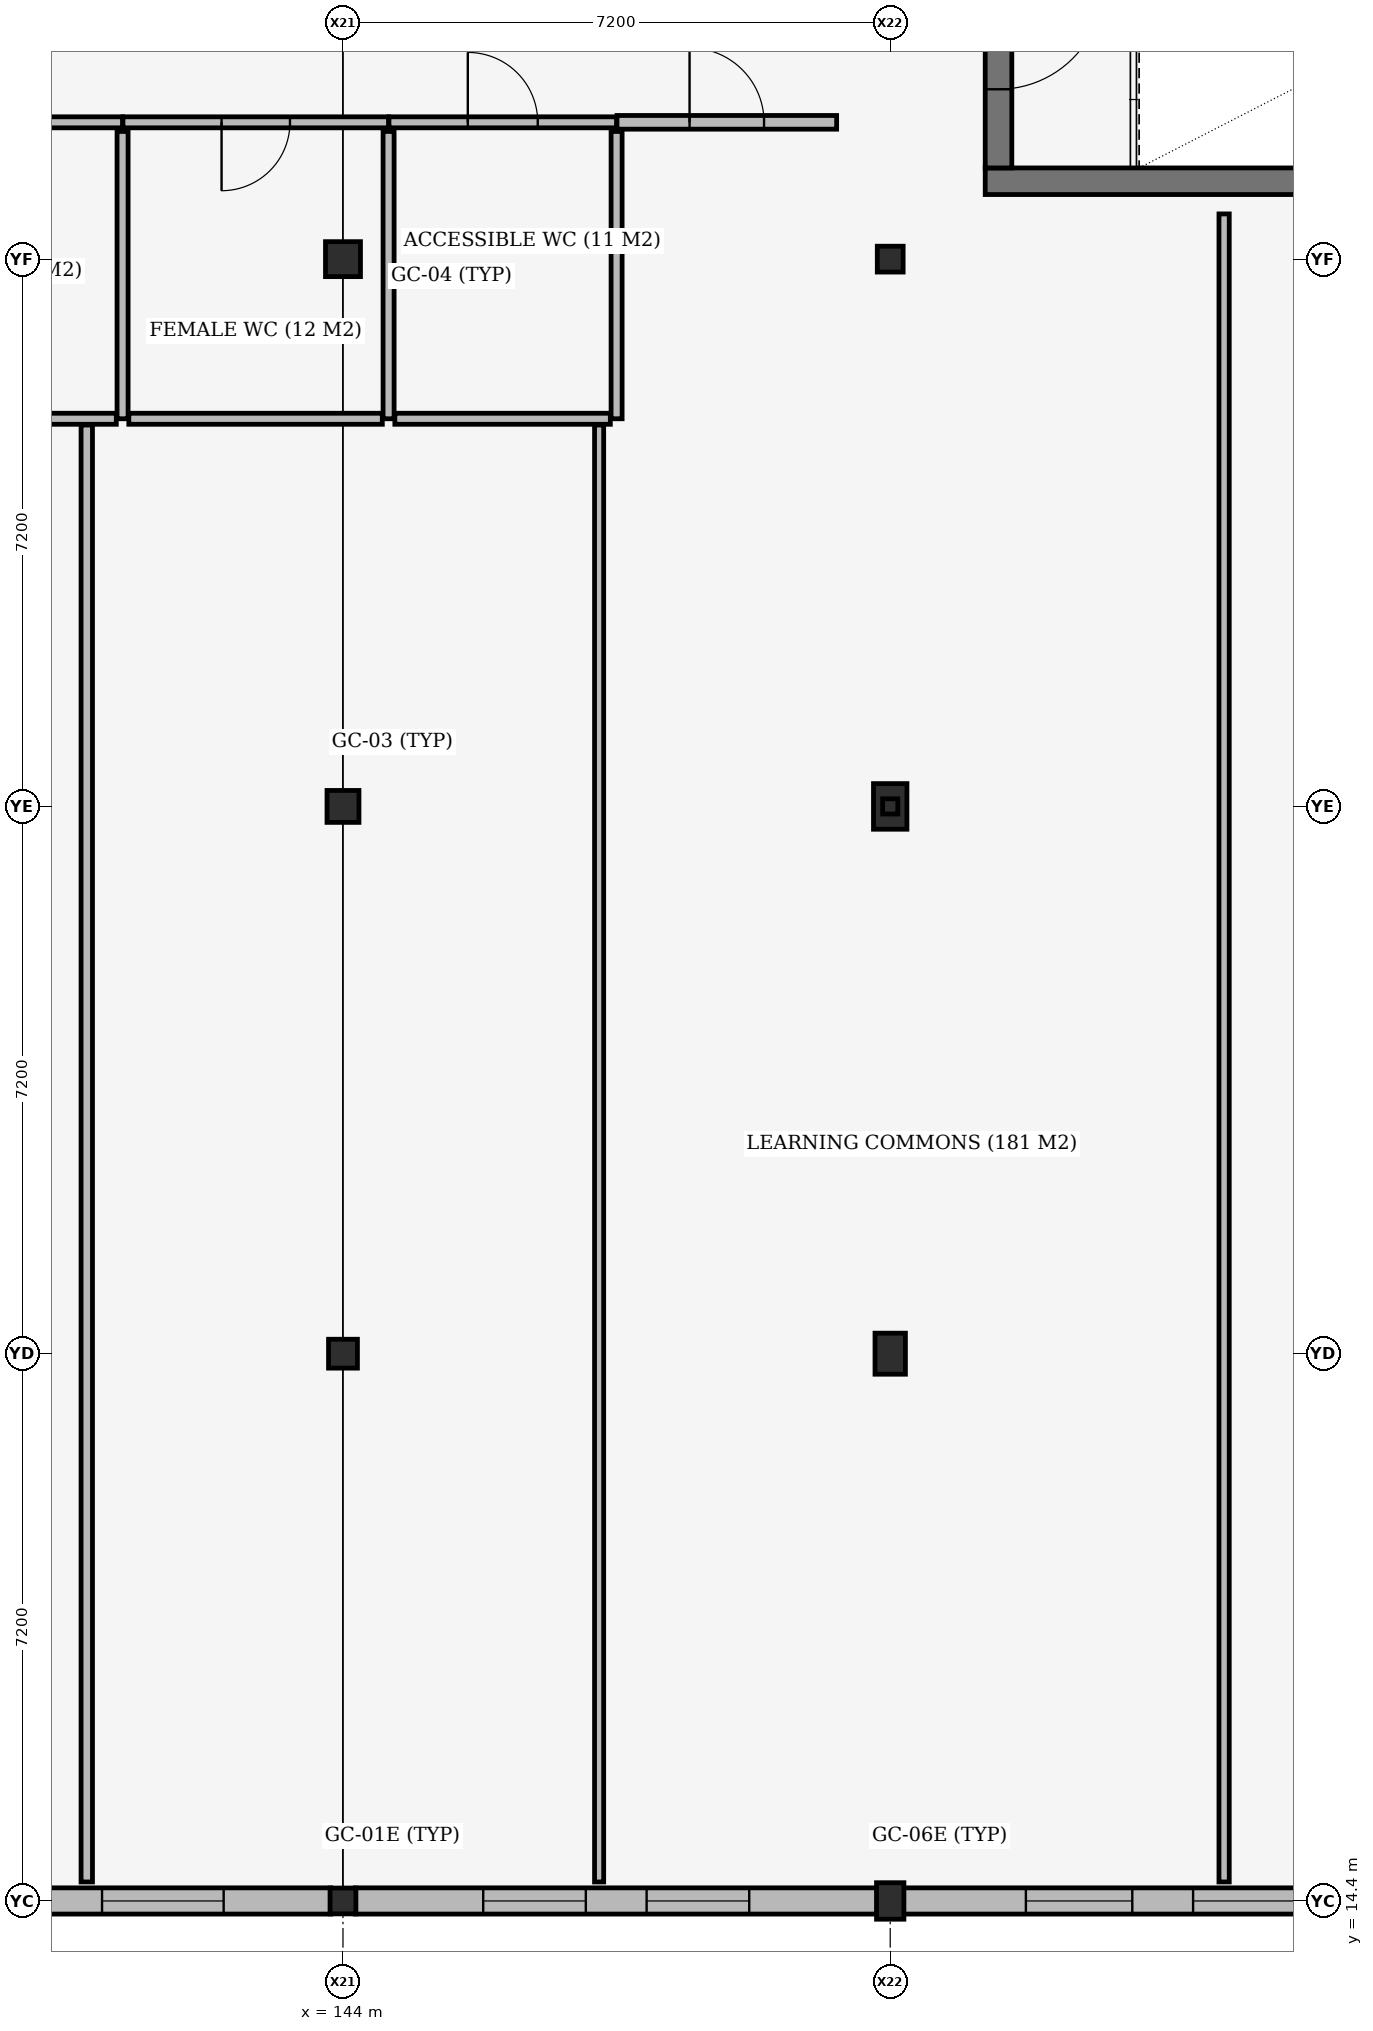
"""IFC4 building model, lengths in metres.
Left out: names, types, materials, properties, quantities, classifications, styles, units other than length and angle.
Written with IfcOpenShell. Run it as: python <this file> out.ifc"""

import sys

from ifc_helpers import new_model, si_unit, direction, frame, frame_2d, origin, origin_2d, place, context, subcontext, project, spatial, rectangle, i_section, extrude, element, fill, save


model = new_model("IFC4")
c1 = context("Model", 3, precision=1e-05, world=origin(), true_north=direction((0.0, 1.0)))
c2 = subcontext(c1, "Body", "Model", "MODEL_VIEW")
j1 = project(units=[si_unit("LENGTHUNIT", "METRE"), si_unit("PLANEANGLEUNIT", "RADIAN")], contexts=[c1])
p1 = place(None, origin())
s1 = spatial("IfcSite", under=j1, at=p1, CompositionType="ELEMENT")
p2 = place(p1, origin())
s2 = spatial("IfcBuilding", under=s1, at=p2, CompositionType="ELEMENT")
p3 = place(p2, frame((0.0, 0.0, 13.8)))
s3 = spatial("IfcBuildingStorey", under=s2, at=p3, CompositionType="ELEMENT", Elevation=13.8)
p4 = place(p3, frame((144.0, 14.4, 0.0), z_axis=(0.0, 0.0, 1.0), x_axis=(1.0, 0.0, 0.0)))
e1 = element("IfcColumn", 1, at=p4, inside=s3, PredefinedType="COLUMN", context=c2, shape_type="SweptSolid", body=[
    extrude(rectangle(XDim=0.34, YDim=0.34, at=origin_2d()), origin(), (0.0, 0.0, 1.0), 3.96),
])
p5 = place(p3, frame((144.0, 21.6, 0.0), z_axis=(0.0, 0.0, 1.0), x_axis=(1.0, 0.0, 0.0)))
e2 = element("IfcColumn", 2, at=p5, inside=s3, PredefinedType="COLUMN", context=c2, shape_type="SweptSolid", body=[
    extrude(rectangle(XDim=0.38, YDim=0.38, at=origin_2d()), origin(), (0.0, 0.0, 1.0), 3.96),
])
p6 = place(p3, frame((144.0, 28.8, 0.0), z_axis=(0.0, 0.0, 1.0), x_axis=(1.0, 0.0, 0.0)))
e3 = element("IfcColumn", 3, at=p6, inside=s3, PredefinedType="COLUMN", context=c2, shape_type="SweptSolid", body=[
    extrude(rectangle(XDim=0.42, YDim=0.42, at=origin_2d()), origin(), (0.0, 0.0, 1.0), 3.96),
])
p7 = place(p3, frame((144.0, 36.0, 0.0), z_axis=(0.0, 0.0, 1.0), x_axis=(1.0, 0.0, 0.0)))
e4 = element("IfcColumn", 4, at=p7, inside=s3, PredefinedType="COLUMN", context=c2, shape_type="SweptSolid", body=[
    extrude(rectangle(XDim=0.46, YDim=0.46, at=origin_2d()), origin(), (0.0, 0.0, 1.0), 3.96),
])
p8 = place(p3, frame((151.2, 14.4, 0.0), z_axis=(0.0, 0.0, 1.0), x_axis=(1.0, 0.0, 0.0)))
e5 = element("IfcColumn", 5, at=p8, inside=s3, PredefinedType="COLUMN", context=c2, shape_type="SweptSolid", body=[
    extrude(rectangle(XDim=0.36, YDim=0.48, at=origin_2d()), origin(), (0.0, 0.0, 1.0), 3.96),
])
p9 = place(p3, frame((151.2, 21.6, 0.0), z_axis=(0.0, 0.0, 1.0), x_axis=(1.0, 0.0, 0.0)))
e6 = element("IfcColumn", 6, at=p9, inside=s3, PredefinedType="COLUMN", context=c2, shape_type="SweptSolid", body=[
    extrude(rectangle(XDim=0.4, YDim=0.54, at=origin_2d()), origin(), (0.0, 0.0, 1.0), 3.96),
])
p10 = place(p3, frame((151.2, 28.8, 0.0), z_axis=(0.0, 0.0, 1.0), x_axis=(1.0, 0.0, 0.0)))
e7 = element("IfcColumn", 7, at=p10, inside=s3, PredefinedType="COLUMN", context=c2, shape_type="SweptSolid", body=[
    extrude(rectangle(XDim=0.44, YDim=0.6, at=origin_2d()), origin(), (0.0, 0.0, 1.0), 3.96),
])
p11 = place(p3, frame((151.2, 36.0, 0.0), z_axis=(0.0, 0.0, 1.0), x_axis=(1.0, 0.0, 0.0)))
e8 = element("IfcColumn", 8, at=p11, inside=s3, PredefinedType="COLUMN", context=c2, shape_type="SweptSolid", body=[
    extrude(rectangle(XDim=0.34, YDim=0.34, at=origin_2d()), origin(), (0.0, 0.0, 1.0), 3.96),
])
p12 = place(p3, frame((152.45, 37.025, 0.0), z_axis=(0.0, 0.0, 1.0), x_axis=(1.0, 0.0, 0.0)))
e9 = element("IfcWall", 9, at=p12, inside=s3, PredefinedType="SHEAR", context=c2, shape_type="SweptSolid", body=[
    extrude(rectangle(XDim=9.1, YDim=0.35, at=frame_2d((4.55, 0.0))), origin(), (0.0, 0.0, 1.0), 3.96),
])
p13 = place(p3, frame((151.2, 28.8, 3.96), z_axis=(0.0, 0.0, 1.0), x_axis=(1.0, 0.0, 0.0)))
e10 = element("IfcColumn", 10, at=p13, inside=s3, PredefinedType="COLUMN", context=c2, shape_type="SweptSolid", body=[
    extrude(i_section(OverallWidth=0.2, OverallDepth=0.2, WebThickness=0.009, FlangeThickness=0.015, FilletRadius=0.018, at=origin_2d()), origin(), (0.0, 0.0, 1.0), 2.655),
])
p14 = place(p3, frame((143.838, 14.4, 0.0), z_axis=(0.0, 0.0, 1.0), x_axis=(-1.0, 0.0, 0.0)))
e11 = element("IfcWall", 11, at=p14, inside=s3, PredefinedType="STANDARD", context=c2, shape_type="SweptSolid", body=[
    extrude(rectangle(XDim=6.816, YDim=0.345, at=frame_2d((3.408, 0.0))), origin(), (0.0, 0.0, 1.0), 3.96),
])
p15 = place(p14, frame((1.408, 0.0, 0.8)))
e12 = element("IfcOpeningElement", 12, at=p15, cuts=e11, PredefinedType="OPENING", context=c2, shape_type="SweptSolid", body=[
    extrude(rectangle(XDim=1.6, YDim=2.6, at=frame_2d((0.8, 1.3))), frame((0.0, 0.182, 0.0), z_axis=(0.0, -1.0, 0.0), x_axis=(1.0, 0.0, 0.0)), (0.0, 0.0, 1.0), 0.365),
])
p16 = place(p14, frame((3.808, 0.0, 0.8)))
e13 = element("IfcOpeningElement", 13, at=p16, cuts=e11, PredefinedType="OPENING", context=c2, shape_type="SweptSolid", body=[
    extrude(rectangle(XDim=1.6, YDim=2.6, at=frame_2d((0.8, 1.3))), frame((0.0, 0.182, 0.0), z_axis=(0.0, -1.0, 0.0), x_axis=(1.0, 0.0, 0.0)), (0.0, 0.0, 1.0), 0.365),
])
p17 = place(p3, frame((151.028, 14.4, 0.0), z_axis=(0.0, 0.0, 1.0), x_axis=(-1.0, 0.0, 0.0)))
e14 = element("IfcWall", 14, at=p17, inside=s3, PredefinedType="STANDARD", context=c2, shape_type="SweptSolid", body=[
    extrude(rectangle(XDim=6.866, YDim=0.345, at=frame_2d((3.433, 0.0))), origin(), (0.0, 0.0, 1.0), 3.96),
])
p18 = place(p17, frame((1.683, 0.0, 0.95)))
e15 = element("IfcOpeningElement", 15, at=p18, cuts=e14, PredefinedType="OPENING", context=c2, shape_type="SweptSolid", body=[
    extrude(rectangle(XDim=1.35, YDim=2.0, at=frame_2d((0.675, 1.0))), frame((0.0, 0.182, 0.0), z_axis=(0.0, -1.0, 0.0), x_axis=(1.0, 0.0, 0.0)), (0.0, 0.0, 1.0), 0.365),
])
p19 = place(p17, frame((3.833, 0.0, 0.95)))
e16 = element("IfcOpeningElement", 16, at=p19, cuts=e14, PredefinedType="OPENING", context=c2, shape_type="SweptSolid", body=[
    extrude(rectangle(XDim=1.35, YDim=2.0, at=frame_2d((0.675, 1.0))), frame((0.0, 0.182, 0.0), z_axis=(0.0, -1.0, 0.0), x_axis=(1.0, 0.0, 0.0)), (0.0, 0.0, 1.0), 0.365),
])
p20 = place(p3, frame((158.198, 14.4, 0.0), z_axis=(0.0, 0.0, 1.0), x_axis=(-1.0, 0.0, 0.0)))
e17 = element("IfcWall", 17, at=p20, inside=s3, PredefinedType="STANDARD", context=c2, shape_type="SweptSolid", body=[
    extrude(rectangle(XDim=6.826, YDim=0.345, at=frame_2d((3.413, 0.0))), origin(), (0.0, 0.0, 1.0), 3.96),
])
p21 = place(p20, frame((1.613, 0.0, 0.8)))
e18 = element("IfcOpeningElement", 18, at=p21, cuts=e17, PredefinedType="OPENING", context=c2, shape_type="SweptSolid", body=[
    extrude(rectangle(XDim=1.4, YDim=2.6, at=frame_2d((0.7, 1.3))), frame((0.0, 0.182, 0.0), z_axis=(0.0, -1.0, 0.0), x_axis=(1.0, 0.0, 0.0)), (0.0, 0.0, 1.0), 0.365),
])
p22 = place(p20, frame((3.813, 0.0, 0.8)))
e19 = element("IfcOpeningElement", 19, at=p22, cuts=e17, PredefinedType="OPENING", context=c2, shape_type="SweptSolid", body=[
    extrude(rectangle(XDim=1.4, YDim=2.6, at=frame_2d((0.7, 1.3))), frame((0.0, 0.182, 0.0), z_axis=(0.0, -1.0, 0.0), x_axis=(1.0, 0.0, 0.0)), (0.0, 0.0, 1.0), 0.365),
])
p23 = place(p3, frame((152.625, 40.65, 0.0), z_axis=(0.0, 0.0, 1.0), x_axis=(0.0, -1.0, 0.0)))
e20 = element("IfcWall", 20, at=p23, inside=s3, PredefinedType="SHEAR", context=c2, shape_type="SweptSolid", body=[
    extrude(rectangle(XDim=3.45, YDim=0.35, at=frame_2d((1.725, 0.0))), origin(), (0.0, 0.0, 1.0), 3.96),
])
p24 = place(p23, frame((1.035, 0.0, 0.0)))
e21 = element("IfcOpeningElement", 21, at=p24, cuts=e20, PredefinedType="OPENING", context=c2, shape_type="SweptSolid", body=[
    extrude(rectangle(XDim=1.38, YDim=2.2, at=frame_2d((0.69, 1.1))), frame((0.0, 0.185, 0.0), z_axis=(0.0, -1.0, 0.0), x_axis=(1.0, 0.0, 0.0)), (0.0, 0.0, 1.0), 0.37),
])
p25 = place(p3, frame((137.6, 37.8, 0.0), z_axis=(0.0, 0.0, 1.0), x_axis=(1.0, 0.0, 0.0)))
e22 = element("IfcWall", 22, at=p25, inside=s3, PredefinedType="PLUMBINGWALL", context=c2, shape_type="SweptSolid", body=[
    extrude(rectangle(XDim=3.5, YDim=0.145, at=frame_2d((1.75, 0.0))), origin(), (0.0, 0.0, 1.0), 3.96),
])
p26 = place(p25, frame((1.3, 0.0, 0.0)))
e23 = element("IfcOpeningElement", 23, at=p26, cuts=e22, PredefinedType="OPENING", context=c2, shape_type="SweptSolid", body=[
    extrude(rectangle(XDim=0.9, YDim=2.1, at=frame_2d((0.45, 1.05))), frame((0.0, 0.083, 0.0), z_axis=(0.0, -1.0, 0.0), x_axis=(1.0, 0.0, 0.0)), (0.0, 0.0, 1.0), 0.165),
])
p27 = place(p3, frame((141.1, 33.9, 0.0), z_axis=(0.0, 0.0, 1.0), x_axis=(0.0, 1.0, 0.0)))
e24 = element("IfcWall", 24, at=p27, inside=s3, PredefinedType="PLUMBINGWALL", context=c2, shape_type="SweptSolid", body=[
    extrude(rectangle(XDim=3.78, YDim=0.145, at=frame_2d((1.89, 0.0))), origin(), (0.0, 0.0, 1.0), 3.96),
])
p28 = place(p3, frame((137.683, 33.9, 0.0), z_axis=(0.0, 0.0, 1.0), x_axis=(1.0, 0.0, 0.0)))
e25 = element("IfcWall", 25, at=p28, inside=s3, PredefinedType="PLUMBINGWALL", context=c2, shape_type="SweptSolid", body=[
    extrude(rectangle(XDim=3.335, YDim=0.145, at=frame_2d((1.667, 0.0))), origin(), (0.0, 0.0, 1.0), 3.96),
])
p29 = place(p3, frame((141.105, 37.8, 0.0), z_axis=(0.0, 0.0, 1.0), x_axis=(1.0, 0.0, 0.0)))
e26 = element("IfcWall", 26, at=p29, inside=s3, PredefinedType="PLUMBINGWALL", context=c2, shape_type="SweptSolid", body=[
    extrude(rectangle(XDim=3.495, YDim=0.145, at=frame_2d((1.748, 0.0))), origin(), (0.0, 0.0, 1.0), 3.96),
])
p30 = place(p29, frame((1.298, 0.0, 0.0)))
e27 = element("IfcOpeningElement", 27, at=p30, cuts=e26, PredefinedType="OPENING", context=c2, shape_type="SweptSolid", body=[
    extrude(rectangle(XDim=0.9, YDim=2.1, at=frame_2d((0.45, 1.05))), frame((0.0, 0.083, 0.0), z_axis=(0.0, -1.0, 0.0), x_axis=(1.0, 0.0, 0.0)), (0.0, 0.0, 1.0), 0.165),
])
p31 = place(p3, frame((144.6, 33.9, 0.0), z_axis=(0.0, 0.0, 1.0), x_axis=(0.0, 1.0, 0.0)))
e28 = element("IfcWall", 28, at=p31, inside=s3, PredefinedType="PLUMBINGWALL", context=c2, shape_type="SweptSolid", body=[
    extrude(rectangle(XDim=3.78, YDim=0.145, at=frame_2d((1.89, 0.0))), origin(), (0.0, 0.0, 1.0), 3.96),
])
p32 = place(p3, frame((141.183, 33.9, 0.0), z_axis=(0.0, 0.0, 1.0), x_axis=(1.0, 0.0, 0.0)))
e29 = element("IfcWall", 29, at=p32, inside=s3, PredefinedType="PLUMBINGWALL", context=c2, shape_type="SweptSolid", body=[
    extrude(rectangle(XDim=3.335, YDim=0.145, at=frame_2d((1.667, 0.0))), origin(), (0.0, 0.0, 1.0), 3.96),
])
p33 = place(p3, frame((144.605, 37.8, 0.0), z_axis=(0.0, 0.0, 1.0), x_axis=(1.0, 0.0, 0.0)))
e30 = element("IfcWall", 30, at=p33, inside=s3, PredefinedType="PLUMBINGWALL", context=c2, shape_type="SweptSolid", body=[
    extrude(rectangle(XDim=2.995, YDim=0.145, at=frame_2d((1.498, 0.0))), origin(), (0.0, 0.0, 1.0), 3.96),
])
p34 = place(p33, frame((1.038, 0.0, 0.0)))
e31 = element("IfcOpeningElement", 31, at=p34, cuts=e30, PredefinedType="OPENING", context=c2, shape_type="SweptSolid", body=[
    extrude(rectangle(XDim=0.92, YDim=2.1, at=frame_2d((0.46, 1.05))), frame((0.0, 0.083, 0.0), z_axis=(0.0, -1.0, 0.0), x_axis=(1.0, 0.0, 0.0)), (0.0, 0.0, 1.0), 0.165),
])
p35 = place(p3, frame((147.6, 33.9, 0.0), z_axis=(0.0, 0.0, 1.0), x_axis=(0.0, 1.0, 0.0)))
e32 = element("IfcWall", 32, at=p35, inside=s3, PredefinedType="PLUMBINGWALL", context=c2, shape_type="SweptSolid", body=[
    extrude(rectangle(XDim=3.78, YDim=0.145, at=frame_2d((1.89, 0.0))), origin(), (0.0, 0.0, 1.0), 3.96),
])
p36 = place(p3, frame((144.683, 33.9, 0.0), z_axis=(0.0, 0.0, 1.0), x_axis=(1.0, 0.0, 0.0)))
e33 = element("IfcWall", 33, at=p36, inside=s3, PredefinedType="PLUMBINGWALL", context=c2, shape_type="SweptSolid", body=[
    extrude(rectangle(XDim=2.835, YDim=0.145, at=frame_2d((1.417, 0.0))), origin(), (0.0, 0.0, 1.0), 3.96),
])
p37 = place(p3, frame((140.629, 14.65, 0.0), z_axis=(0.0, 0.0, 1.0), x_axis=(0.0, 1.0, 0.0)))
e34 = element("IfcWall", 34, at=p37, inside=s3, PredefinedType="PARTITIONING", context=c2, shape_type="SweptSolid", body=[
    extrude(rectangle(XDim=19.167, YDim=0.15, at=frame_2d((9.584, 0.0))), origin(), (0.0, 0.0, 1.0), 3.96),
])
p38 = place(p3, frame((147.605, 37.8, 0.0), z_axis=(0.0, 0.0, 1.0), x_axis=(1.0, 0.0, 0.0)))
e35 = element("IfcWall", 35, at=p38, inside=s3, PredefinedType="PARTITIONING", context=c2, shape_type="SweptSolid", body=[
    extrude(rectangle(XDim=2.89, YDim=0.18, at=frame_2d((1.445, 0.0))), origin(), (0.0, 0.0, 1.0), 3.96),
])
p39 = place(p38, frame((0.955, 0.0, 0.0)))
e36 = element("IfcOpeningElement", 36, at=p39, cuts=e35, PredefinedType="OPENING", context=c2, shape_type="SweptSolid", body=[
    extrude(rectangle(XDim=0.98, YDim=2.18, at=frame_2d((0.49, 1.09))), frame((0.0, 0.1, 0.0), z_axis=(0.0, -1.0, 0.0), x_axis=(1.0, 0.0, 0.0)), (0.0, 0.0, 1.0), 0.2),
])
p40 = place(p3, frame((147.37, 14.65, 0.0), z_axis=(0.0, 0.0, 1.0), x_axis=(0.0, 1.0, 0.0)))
e37 = element("IfcWall", 37, at=p40, inside=s3, PredefinedType="PARTITIONING", context=c2, shape_type="SweptSolid", body=[
    extrude(rectangle(XDim=19.167, YDim=0.12, at=frame_2d((9.584, 0.0))), origin(), (0.0, 0.0, 1.0), 3.96),
])
p41 = place(p3, frame((155.593, 14.65, 0.0), z_axis=(0.0, 0.0, 1.0), x_axis=(0.0, 1.0, 0.0)))
e38 = element("IfcWall", 38, at=p41, inside=s3, PredefinedType="PARTITIONING", context=c2, shape_type="SweptSolid", body=[
    extrude(rectangle(XDim=21.945, YDim=0.135, at=frame_2d((10.973, 0.0))), origin(), (0.0, 0.0, 1.0), 3.96),
])
p42 = place(p15, origin())
e39 = element("IfcWindow", 39, at=p42, inside=s3, PartitioningType="DOUBLE_PANEL_VERTICAL", PredefinedType="WINDOW", context=c2, shape_type="SweptSolid", body=[
    extrude(rectangle(XDim=1.6, YDim=2.6, at=frame_2d((0.8, 1.3))), frame((0.0, 0.03, 0.0), z_axis=(0.0, -1.0, 0.0), x_axis=(1.0, 0.0, 0.0)), (0.0, 0.0, 1.0), 0.06),
])
fill(e12, e39)
p43 = place(p18, origin())
e40 = element("IfcWindow", 40, at=p43, inside=s3, PartitioningType="DOUBLE_PANEL_VERTICAL", PredefinedType="WINDOW", context=c2, shape_type="SweptSolid", body=[
    extrude(rectangle(XDim=1.35, YDim=2.0, at=frame_2d((0.675, 1.0))), frame((0.0, 0.03, 0.0), z_axis=(0.0, -1.0, 0.0), x_axis=(1.0, 0.0, 0.0)), (0.0, 0.0, 1.0), 0.06),
])
fill(e15, e40)
p44 = place(p19, origin())
e41 = element("IfcWindow", 41, at=p44, inside=s3, PartitioningType="DOUBLE_PANEL_VERTICAL", PredefinedType="WINDOW", context=c2, shape_type="SweptSolid", body=[
    extrude(rectangle(XDim=1.35, YDim=2.0, at=frame_2d((0.675, 1.0))), frame((0.0, 0.03, 0.0), z_axis=(0.0, -1.0, 0.0), x_axis=(1.0, 0.0, 0.0)), (0.0, 0.0, 1.0), 0.06),
])
fill(e16, e41)
p45 = place(p21, origin())
e42 = element("IfcWindow", 42, at=p45, inside=s3, PartitioningType="DOUBLE_PANEL_VERTICAL", PredefinedType="WINDOW", context=c2, shape_type="SweptSolid", body=[
    extrude(rectangle(XDim=1.4, YDim=2.6, at=frame_2d((0.7, 1.3))), frame((0.0, 0.03, 0.0), z_axis=(0.0, -1.0, 0.0), x_axis=(1.0, 0.0, 0.0)), (0.0, 0.0, 1.0), 0.06),
])
fill(e18, e42)
p46 = place(p22, origin())
e43 = element("IfcWindow", 43, at=p46, inside=s3, PartitioningType="DOUBLE_PANEL_VERTICAL", PredefinedType="WINDOW", context=c2, shape_type="SweptSolid", body=[
    extrude(rectangle(XDim=1.4, YDim=2.6, at=frame_2d((0.7, 1.3))), frame((0.0, 0.03, 0.0), z_axis=(0.0, -1.0, 0.0), x_axis=(1.0, 0.0, 0.0)), (0.0, 0.0, 1.0), 0.06),
])
fill(e19, e43)
p47 = place(p24, origin())
e44 = element("IfcDoor", 44, at=p47, inside=s3, OperationType="DOUBLE_DOOR_SINGLE_SWING", PredefinedType="DOOR", context=c2, shape_type="SweptSolid", body=[
    extrude(rectangle(XDim=1.38, YDim=2.2, at=frame_2d((0.69, 1.1))), frame((0.0, 0.025, 0.0), z_axis=(0.0, -1.0, 0.0), x_axis=(1.0, 0.0, 0.0)), (0.0, 0.0, 1.0), 0.05),
])
fill(e21, e44)
p48 = place(p30, origin())
e45 = element("IfcDoor", 45, at=p48, inside=s3, OperationType="SINGLE_SWING_RIGHT", PredefinedType="DOOR", context=c2, shape_type="SweptSolid", body=[
    extrude(rectangle(XDim=0.9, YDim=2.1, at=frame_2d((0.45, 1.05))), frame((0.0, 0.025, 0.0), z_axis=(0.0, -1.0, 0.0), x_axis=(1.0, 0.0, 0.0)), (0.0, 0.0, 1.0), 0.05),
])
fill(e27, e45)
p49 = place(p34, origin())
e46 = element("IfcDoor", 46, at=p49, inside=s3, OperationType="SINGLE_SWING_LEFT", PredefinedType="DOOR", context=c2, shape_type="SweptSolid", body=[
    extrude(rectangle(XDim=0.92, YDim=2.1, at=frame_2d((0.46, 1.05))), frame((0.0, 0.025, 0.0), z_axis=(0.0, -1.0, 0.0), x_axis=(1.0, 0.0, 0.0)), (0.0, 0.0, 1.0), 0.05),
])
fill(e31, e46)
p50 = place(p39, origin())
e47 = element("IfcDoor", 47, at=p50, inside=s3, OperationType="SINGLE_SWING_LEFT", PredefinedType="DOOR", context=c2, shape_type="SweptSolid", body=[
    extrude(rectangle(XDim=0.98, YDim=2.18, at=frame_2d((0.49, 1.09))), frame((0.0, 0.025, 0.0), z_axis=(0.0, -1.0, 0.0), x_axis=(1.0, 0.0, 0.0)), (0.0, 0.0, 1.0), 0.05),
])
fill(e36, e47)
save(model, sys.argv[1])
